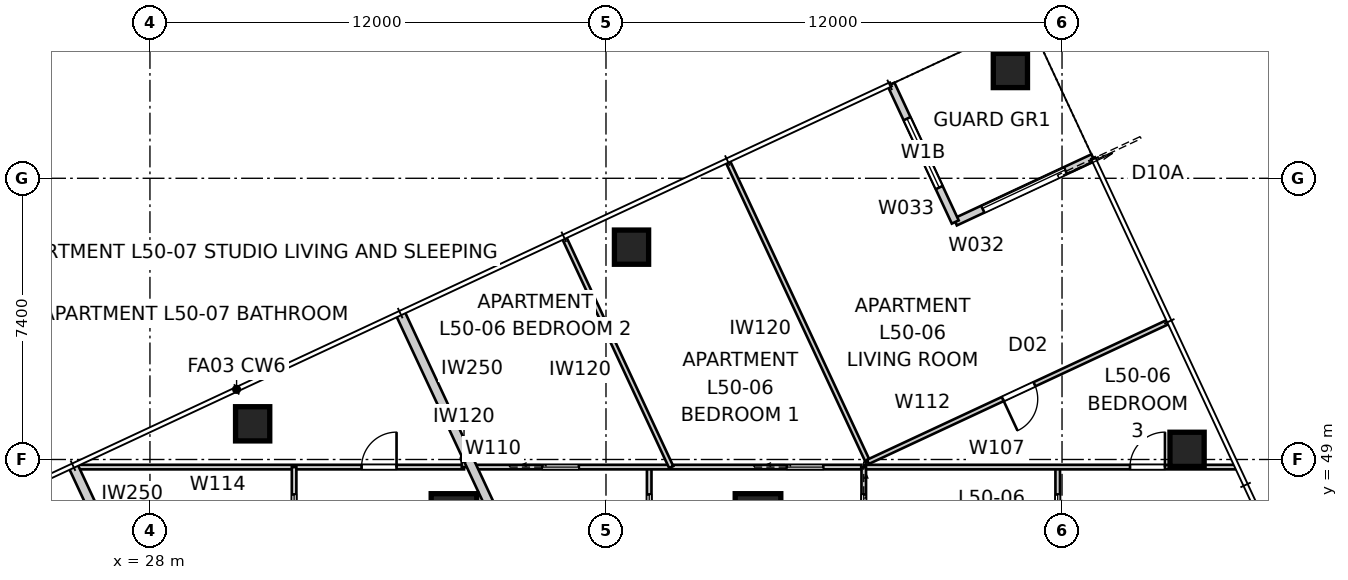
"""IFC4 building model, lengths in metres.
Left out: names, types, materials, properties, quantities, classifications, styles, units other than length and angle.
Written with IfcOpenShell. Run it as: python <this file> out.ifc"""

import sys

from ifc_helpers import new_model, si_unit, direction, frame, frame_2d, origin, origin_2d, place, context, subcontext, project, spatial, rectangle, extrude, element, fill, save


model = new_model("IFC4")
c1 = context("Model", 3, precision=1e-05, world=origin(), true_north=direction((0.0, 1.0)))
c2 = subcontext(c1, "Body", "Model", "MODEL_VIEW")
j1 = project(units=[si_unit("LENGTHUNIT", "METRE"), si_unit("PLANEANGLEUNIT", "RADIAN")], contexts=[c1])
p1 = place(None, origin())
s1 = spatial("IfcSite", under=j1, at=p1, CompositionType="ELEMENT")
p2 = place(p1, origin())
s2 = spatial("IfcBuilding", under=s1, at=p2, CompositionType="ELEMENT")
p3 = place(p2, frame((0.0, 0.0, 182.8)))
s3 = spatial("IfcBuildingStorey", under=s2, at=p3, CompositionType="ELEMENT", Elevation=182.8)
for number, where, z_axis, x_axis in (
    (1, (55.29, 49.267, 0.0), (0.0, 0.0, 1.0), (1.0, 0.0, 0.0)),
    (2, (50.641, 59.236, 0.0), (0.0, 0.0, 1.0), (1.0, 0.0, 0.0)),
    (3, (40.672, 54.588, 0.0), (0.0, 0.0, 1.0), (1.0, 0.0, 0.0)),
    (4, (30.702, 49.939, 0.0), (0.0, 0.0, 1.0), (1.0, 0.0, 0.0)),
):
    element("IfcColumn", number, at=place(p3, frame(where, z_axis=z_axis, x_axis=x_axis)), inside=s3, PredefinedType="COLUMN", context=c2, shape_type="SweptSolid", body=[
        extrude(rectangle(XDim=0.9, YDim=0.9, at=origin_2d()), origin(), (0.0, 0.0, 1.0), 3.4),
    ])
for number, where, z_axis, x_axis in (
    (5, (44.0, 47.5, 0.0), (0.0, 0.0, 1.0), (1.0, 0.0, 0.0)),
    (6, (36.0, 47.5, 0.0), (0.0, 0.0, 1.0), (1.0, 0.0, 0.0)),
):
    element("IfcColumn", number, at=place(p3, frame(where, z_axis=z_axis, x_axis=x_axis)), inside=s3, PredefinedType="COLUMN", context=c2, shape_type="SweptSolid", body=[
        extrude(rectangle(XDim=1.2, YDim=1.2, at=origin_2d()), origin(), (0.0, 0.0, 1.0), 3.4),
    ])
p4 = place(p3, frame((52.815, 56.94, 0.0), z_axis=(0.0, 0.0, 1.0), x_axis=(-0.906289140828, -0.422658246362, 0.0)))
e7 = element("IfcWall", 7, at=p4, inside=s3, PredefinedType="SOLIDWALL", context=c2, shape_type="SweptSolid", body=[
    extrude(rectangle(XDim=4.0, YDim=0.2, at=frame_2d((2.0, 0.0))), origin(), (0.0, 0.0, 1.0), 3.25),
])
p5 = place(p4, frame((0.8, 0.0, 0.0)))
e8 = element("IfcOpeningElement", 8, at=p5, cuts=e7, PredefinedType="OPENING", context=c2, shape_type="SweptSolid", body=[
    extrude(rectangle(XDim=2.4, YDim=2.1, at=frame_2d((1.2, 1.05))), frame((0.0, 0.11, 0.0), z_axis=(0.0, -1.0, 0.0), x_axis=(1.0, 0.0, 0.0)), (0.0, 0.0, 1.0), 0.22),
])
p6 = place(p3, frame((49.19, 55.25, 0.0), z_axis=(0.0, 0.0, 1.0), x_axis=(-0.422658246362, 0.906289140828, 0.0)))
e9 = element("IfcWall", 9, at=p6, inside=s3, PredefinedType="SOLIDWALL", context=c2, shape_type="SweptSolid", body=[
    extrude(rectangle(XDim=4.0, YDim=0.2, at=frame_2d((2.0, 0.0))), origin(), (0.0, 0.0, 1.0), 3.25),
])
p7 = place(p6, frame((1.0, 0.0, 0.45)))
e10 = element("IfcOpeningElement", 10, at=p7, cuts=e9, PredefinedType="OPENING", context=c2, shape_type="SweptSolid", body=[
    extrude(rectangle(XDim=2.0, YDim=1.8, at=frame_2d((1.0, 0.9))), frame((0.0, 0.11, 0.0), z_axis=(0.0, -1.0, 0.0), x_axis=(1.0, 0.0, 0.0)), (0.0, 0.0, 1.0), 0.22),
])
p8 = place(p3, frame((34.585, 52.853, 0.0), z_axis=(0.0, 0.0, 1.0), x_axis=(0.422623839356, -0.906305186131, 0.0)))
e11 = element("IfcWall", 11, at=p8, inside=s3, PredefinedType="PARTITIONING", context=c2, shape_type="SweptSolid", body=[
    extrude(rectangle(XDim=7.101, YDim=0.25, at=frame_2d((3.551, 0.0))), origin(), (0.0, 0.0, 1.0), 3.25),
])
p9 = place(p3, frame((25.975, 48.838, 0.0), z_axis=(0.0, 0.0, 1.0), x_axis=(0.422590257842, -0.906320844943, 0.0)))
e12 = element("IfcWall", 12, at=p9, inside=s3, PredefinedType="PARTITIONING", context=c2, shape_type="SweptSolid", body=[
    extrude(rectangle(XDim=2.671, YDim=0.25, at=frame_2d((1.336, 0.0))), origin(), (0.0, 0.0, 1.0), 3.25),
])
p10 = place(p3, frame((51.886, 46.4, 0.0), z_axis=(0.0, 0.0, 1.0), x_axis=(0.0, 1.0, 0.0)))
e13 = element("IfcWall", 13, at=p10, inside=s3, PredefinedType="PARTITIONING", context=c2, shape_type="SweptSolid", body=[
    extrude(rectangle(XDim=2.4, YDim=0.12, at=frame_2d((1.2, 0.0))), origin(), (0.0, 0.0, 1.0), 3.25),
])
p11 = place(p10, frame((0.72, 0.0, 0.0)))
e14 = element("IfcOpeningElement", 14, at=p11, cuts=e13, PredefinedType="OPENING", context=c2, shape_type="SweptSolid", body=[
    extrude(rectangle(XDim=0.96, YDim=2.1, at=frame_2d((0.48, 1.05))), frame((0.0, 0.07, 0.0), z_axis=(0.0, -1.0, 0.0), x_axis=(1.0, 0.0, 0.0)), (0.0, 0.0, 1.0), 0.14),
])
p12 = place(p3, frame((46.783, 48.8, 0.0), z_axis=(0.0, 0.0, 1.0), x_axis=(1.0, 0.0, 0.0)))
e15 = element("IfcWall", 15, at=p12, inside=s3, PredefinedType="PARTITIONING", context=c2, shape_type="SweptSolid", body=[
    extrude(rectangle(XDim=9.784, YDim=0.12, at=frame_2d((4.892, 0.0))), origin(), (0.0, 0.0, 1.0), 3.25),
])
p13 = place(p12, frame((7.006, 0.0, 0.0)))
e16 = element("IfcOpeningElement", 16, at=p13, cuts=e15, PredefinedType="OPENING", context=c2, shape_type="SweptSolid", body=[
    extrude(rectangle(XDim=0.92, YDim=2.34, at=frame_2d((0.46, 1.17))), frame((0.0, 0.07, 0.0), z_axis=(0.0, -1.0, 0.0), x_axis=(1.0, 0.0, 0.0)), (0.0, 0.0, 1.0), 0.14),
])
p14 = place(p3, frame((46.783, 48.8, 0.0), z_axis=(0.0, 0.0, 1.0), x_axis=(0.0, -1.0, 0.0)))
e17 = element("IfcWall", 17, at=p14, inside=s3, PredefinedType="PARTITIONING", context=c2, shape_type="SweptSolid", body=[
    extrude(rectangle(XDim=2.4, YDim=0.12, at=frame_2d((1.2, 0.0))), origin(), (0.0, 0.0, 1.0), 3.25),
])
p15 = place(p14, frame((0.72, 0.0, 0.0)))
e18 = element("IfcOpeningElement", 18, at=p15, cuts=e17, PredefinedType="OPENING", context=c2, shape_type="SweptSolid", body=[
    extrude(rectangle(XDim=0.96, YDim=2.1, at=frame_2d((0.48, 1.05))), frame((0.0, 0.07, 0.0), z_axis=(0.0, -1.0, 0.0), x_axis=(1.0, 0.0, 0.0)), (0.0, 0.0, 1.0), 0.14),
])
p16 = place(p3, frame((41.137, 46.4, 0.0), z_axis=(0.0, 0.0, 1.0), x_axis=(0.0, 1.0, 0.0)))
e19 = element("IfcWall", 19, at=p16, inside=s3, PredefinedType="PARTITIONING", context=c2, shape_type="SweptSolid", body=[
    extrude(rectangle(XDim=2.4, YDim=0.12, at=frame_2d((1.2, 0.0))), origin(), (0.0, 0.0, 1.0), 3.25),
])
p17 = place(p16, frame((0.72, 0.0, 0.0)))
e20 = element("IfcOpeningElement", 20, at=p17, cuts=e19, PredefinedType="OPENING", context=c2, shape_type="SweptSolid", body=[
    extrude(rectangle(XDim=0.96, YDim=2.1, at=frame_2d((0.48, 1.05))), frame((0.0, 0.07, 0.0), z_axis=(0.0, -1.0, 0.0), x_axis=(1.0, 0.0, 0.0)), (0.0, 0.0, 1.0), 0.14),
])
p18 = place(p3, frame((36.475, 48.8, 0.0), z_axis=(0.0, 0.0, 1.0), x_axis=(1.0, 0.0, 0.0)))
e21 = element("IfcWall", 21, at=p18, inside=s3, PredefinedType="PARTITIONING", context=c2, shape_type="SweptSolid", body=[
    extrude(rectangle(XDim=10.242, YDim=0.12, at=frame_2d((5.121, 0.0))), origin(), (0.0, 0.0, 1.0), 3.25),
])
p19 = place(p18, frame((8.284, 0.0, 0.0)))
e22 = element("IfcOpeningElement", 22, at=p19, cuts=e21, PredefinedType="OPENING", context=c2, shape_type="SweptSolid", body=[
    extrude(rectangle(XDim=0.96, YDim=2.1, at=frame_2d((0.48, 1.05))), frame((0.0, 0.07, 0.0), z_axis=(0.0, -1.0, 0.0), x_axis=(1.0, 0.0, 0.0)), (0.0, 0.0, 1.0), 0.14),
])
p20 = place(p18, frame((1.851, 0.0, 0.0)))
e23 = element("IfcOpeningElement", 23, at=p20, cuts=e21, PredefinedType="OPENING", context=c2, shape_type="SweptSolid", body=[
    extrude(rectangle(XDim=0.96, YDim=2.1, at=frame_2d((0.48, 1.05))), frame((0.0, 0.07, 0.0), z_axis=(0.0, -1.0, 0.0), x_axis=(1.0, 0.0, 0.0)), (0.0, 0.0, 1.0), 0.14),
])
p21 = place(p3, frame((46.893, 48.937, 0.0), z_axis=(0.0, 0.0, 1.0), x_axis=(-0.422638395676, 0.906298398156, 0.0)))
e24 = element("IfcWall", 24, at=p21, inside=s3, PredefinedType="PARTITIONING", context=c2, shape_type="SweptSolid", body=[
    extrude(rectangle(XDim=8.71, YDim=0.12, at=frame_2d((4.355, 0.0))), origin(), (0.0, 0.0, 1.0), 3.25),
])
p22 = place(p3, frame((54.787, 52.618, 0.0), z_axis=(0.0, 0.0, 1.0), x_axis=(-0.906314140712, -0.422604635972, 0.0)))
e25 = element("IfcWall", 25, at=p22, inside=s3, PredefinedType="PARTITIONING", context=c2, shape_type="SweptSolid", body=[
    extrude(rectangle(XDim=8.71, YDim=0.12, at=frame_2d((4.355, 0.0))), origin(), (0.0, 0.0, 1.0), 3.25),
])
p23 = place(p22, frame((3.875, 0.0, 0.0)))
e26 = element("IfcOpeningElement", 26, at=p23, cuts=e25, PredefinedType="OPENING", context=c2, shape_type="SweptSolid", body=[
    extrude(rectangle(XDim=0.92, YDim=2.34, at=frame_2d((0.46, 1.17))), frame((0.0, 0.07, 0.0), z_axis=(0.0, -1.0, 0.0), x_axis=(1.0, 0.0, 0.0)), (0.0, 0.0, 1.0), 0.14),
])
p24 = place(p3, frame((41.716, 48.8, 0.0), z_axis=(0.0, 0.0, 1.0), x_axis=(-0.422642131948, 0.906296655793, 0.0)))
e27 = element("IfcWall", 27, at=p24, inside=s3, PredefinedType="PARTITIONING", context=c2, shape_type="SweptSolid", body=[
    extrude(rectangle(XDim=6.646, YDim=0.12, at=frame_2d((3.323, 0.0))), origin(), (0.0, 0.0, 1.0), 3.25),
])
p25 = place(p3, frame((25.993, 48.8, 0.0), z_axis=(0.0, 0.0, 1.0), x_axis=(1.0, 0.0, 0.0)))
e28 = element("IfcWall", 28, at=p25, inside=s3, PredefinedType="PARTITIONING", context=c2, shape_type="SweptSolid", body=[
    extrude(rectangle(XDim=10.272, YDim=0.12, at=frame_2d((5.136, 0.0))), origin(), (0.0, 0.0, 1.0), 3.25),
])
p26 = place(p25, frame((7.576, 0.0, 0.0)))
e29 = element("IfcOpeningElement", 29, at=p26, cuts=e28, PredefinedType="OPENING", context=c2, shape_type="SweptSolid", body=[
    extrude(rectangle(XDim=0.92, YDim=2.34, at=frame_2d((0.46, 1.17))), frame((0.0, 0.07, 0.0), z_axis=(0.0, -1.0, 0.0), x_axis=(1.0, 0.0, 0.0)), (0.0, 0.0, 1.0), 0.14),
])
p27 = place(p3, frame((36.265, 48.8, 0.0), z_axis=(0.0, 0.0, 1.0), x_axis=(0.0, 1.0, 0.0)))
e30 = element("IfcWall", 30, at=p27, inside=s3, PredefinedType="PARTITIONING", context=c2, shape_type="SweptSolid", body=[
    extrude(rectangle(XDim=0.45, YDim=0.12, at=frame_2d((0.225, 0.0))), origin(), (0.0, 0.0, 1.0), 3.25),
])
p28 = place(p3, frame((31.793, 46.4, 0.0), z_axis=(0.0, 0.0, 1.0), x_axis=(0.0, 1.0, 0.0)))
e31 = element("IfcWall", 31, at=p28, inside=s3, PredefinedType="PARTITIONING", context=c2, shape_type="SweptSolid", body=[
    extrude(rectangle(XDim=2.4, YDim=0.12, at=frame_2d((1.2, 0.0))), origin(), (0.0, 0.0, 1.0), 3.25),
])
p29 = place(p28, frame((0.72, 0.0, 0.0)))
e32 = element("IfcOpeningElement", 32, at=p29, cuts=e31, PredefinedType="OPENING", context=c2, shape_type="SweptSolid", body=[
    extrude(rectangle(XDim=0.96, YDim=2.1, at=frame_2d((0.48, 1.05))), frame((0.0, 0.07, 0.0), z_axis=(0.0, -1.0, 0.0), x_axis=(1.0, 0.0, 0.0)), (0.0, 0.0, 1.0), 0.14),
])
p30 = place(p5, origin())
e33 = element("IfcDoor", 33, at=p30, inside=s3, OperationType="SLIDING_TO_LEFT", PredefinedType="DOOR", context=c2, shape_type="SweptSolid", body=[
    extrude(rectangle(XDim=2.4, YDim=2.1, at=frame_2d((1.2, 1.05))), frame((0.0, 0.025, 0.0), z_axis=(0.0, -1.0, 0.0), x_axis=(1.0, 0.0, 0.0)), (0.0, 0.0, 1.0), 0.05),
])
fill(e8, e33)
p31 = place(p7, origin())
e34 = element("IfcWindow", 34, at=p31, inside=s3, PartitioningType="SINGLE_PANEL", PredefinedType="WINDOW", context=c2, shape_type="SweptSolid", body=[
    extrude(rectangle(XDim=2.0, YDim=1.8, at=frame_2d((1.0, 0.9))), frame((0.0, 0.03, 0.0), z_axis=(0.0, -1.0, 0.0), x_axis=(1.0, 0.0, 0.0)), (0.0, 0.0, 1.0), 0.06),
])
fill(e10, e34)
p32 = place(p26, origin())
e35 = element("IfcDoor", 35, at=p32, inside=s3, OperationType="SINGLE_SWING_RIGHT", PredefinedType="DOOR", context=c2, shape_type="SweptSolid", body=[
    extrude(rectangle(XDim=0.92, YDim=2.34, at=frame_2d((0.46, 1.17))), frame((0.0, 0.025, 0.0), z_axis=(0.0, -1.0, 0.0), x_axis=(1.0, 0.0, 0.0)), (0.0, 0.0, 1.0), 0.05),
])
fill(e29, e35)
p33 = place(p29, origin())
e36 = element("IfcDoor", 36, at=p33, inside=s3, OperationType="SLIDING_TO_LEFT", PredefinedType="DOOR", context=c2, shape_type="SweptSolid", body=[
    extrude(rectangle(XDim=0.96, YDim=2.1, at=frame_2d((0.48, 1.05))), frame((0.0, 0.025, 0.0), z_axis=(0.0, -1.0, 0.0), x_axis=(1.0, 0.0, 0.0)), (0.0, 0.0, 1.0), 0.05),
])
fill(e32, e36)
p34 = place(p13, origin())
e37 = element("IfcDoor", 37, at=p34, inside=s3, OperationType="SINGLE_SWING_RIGHT", PredefinedType="DOOR", context=c2, shape_type="SweptSolid", body=[
    extrude(rectangle(XDim=0.92, YDim=2.34, at=frame_2d((0.46, 1.17))), frame((0.0, 0.025, 0.0), z_axis=(0.0, -1.0, 0.0), x_axis=(1.0, 0.0, 0.0)), (0.0, 0.0, 1.0), 0.05),
])
fill(e16, e37)
p35 = place(p11, origin())
e38 = element("IfcDoor", 38, at=p35, inside=s3, OperationType="SLIDING_TO_LEFT", PredefinedType="DOOR", context=c2, shape_type="SweptSolid", body=[
    extrude(rectangle(XDim=0.96, YDim=2.1, at=frame_2d((0.48, 1.05))), frame((0.0, 0.025, 0.0), z_axis=(0.0, -1.0, 0.0), x_axis=(1.0, 0.0, 0.0)), (0.0, 0.0, 1.0), 0.05),
])
fill(e14, e38)
p36 = place(p15, origin())
e39 = element("IfcDoor", 39, at=p36, inside=s3, OperationType="SLIDING_TO_LEFT", PredefinedType="DOOR", context=c2, shape_type="SweptSolid", body=[
    extrude(rectangle(XDim=0.96, YDim=2.1, at=frame_2d((0.48, 1.05))), frame((0.0, 0.025, 0.0), z_axis=(0.0, -1.0, 0.0), x_axis=(1.0, 0.0, 0.0)), (0.0, 0.0, 1.0), 0.05),
])
fill(e18, e39)
p37 = place(p19, origin())
e40 = element("IfcDoor", 40, at=p37, inside=s3, OperationType="SLIDING_TO_LEFT", PredefinedType="DOOR", context=c2, shape_type="SweptSolid", body=[
    extrude(rectangle(XDim=0.96, YDim=2.1, at=frame_2d((0.48, 1.05))), frame((0.0, 0.025, 0.0), z_axis=(0.0, -1.0, 0.0), x_axis=(1.0, 0.0, 0.0)), (0.0, 0.0, 1.0), 0.05),
])
fill(e22, e40)
p38 = place(p17, origin())
e41 = element("IfcDoor", 41, at=p38, inside=s3, OperationType="SLIDING_TO_LEFT", PredefinedType="DOOR", context=c2, shape_type="SweptSolid", body=[
    extrude(rectangle(XDim=0.96, YDim=2.1, at=frame_2d((0.48, 1.05))), frame((0.0, 0.025, 0.0), z_axis=(0.0, -1.0, 0.0), x_axis=(1.0, 0.0, 0.0)), (0.0, 0.0, 1.0), 0.05),
])
fill(e20, e41)
p39 = place(p20, origin())
e42 = element("IfcDoor", 42, at=p39, inside=s3, OperationType="SLIDING_TO_LEFT", PredefinedType="DOOR", context=c2, shape_type="SweptSolid", body=[
    extrude(rectangle(XDim=0.96, YDim=2.1, at=frame_2d((0.48, 1.05))), frame((0.0, 0.025, 0.0), z_axis=(0.0, -1.0, 0.0), x_axis=(1.0, 0.0, 0.0)), (0.0, 0.0, 1.0), 0.05),
])
fill(e23, e42)
p40 = place(p23, origin())
e43 = element("IfcDoor", 43, at=p40, inside=s3, OperationType="SINGLE_SWING_RIGHT", PredefinedType="DOOR", context=c2, shape_type="SweptSolid", body=[
    extrude(rectangle(XDim=0.92, YDim=2.34, at=frame_2d((0.46, 1.17))), frame((0.0, 0.025, 0.0), z_axis=(0.0, -1.0, 0.0), x_axis=(1.0, 0.0, 0.0)), (0.0, 0.0, 1.0), 0.05),
])
fill(e26, e43)
save(model, sys.argv[1])
